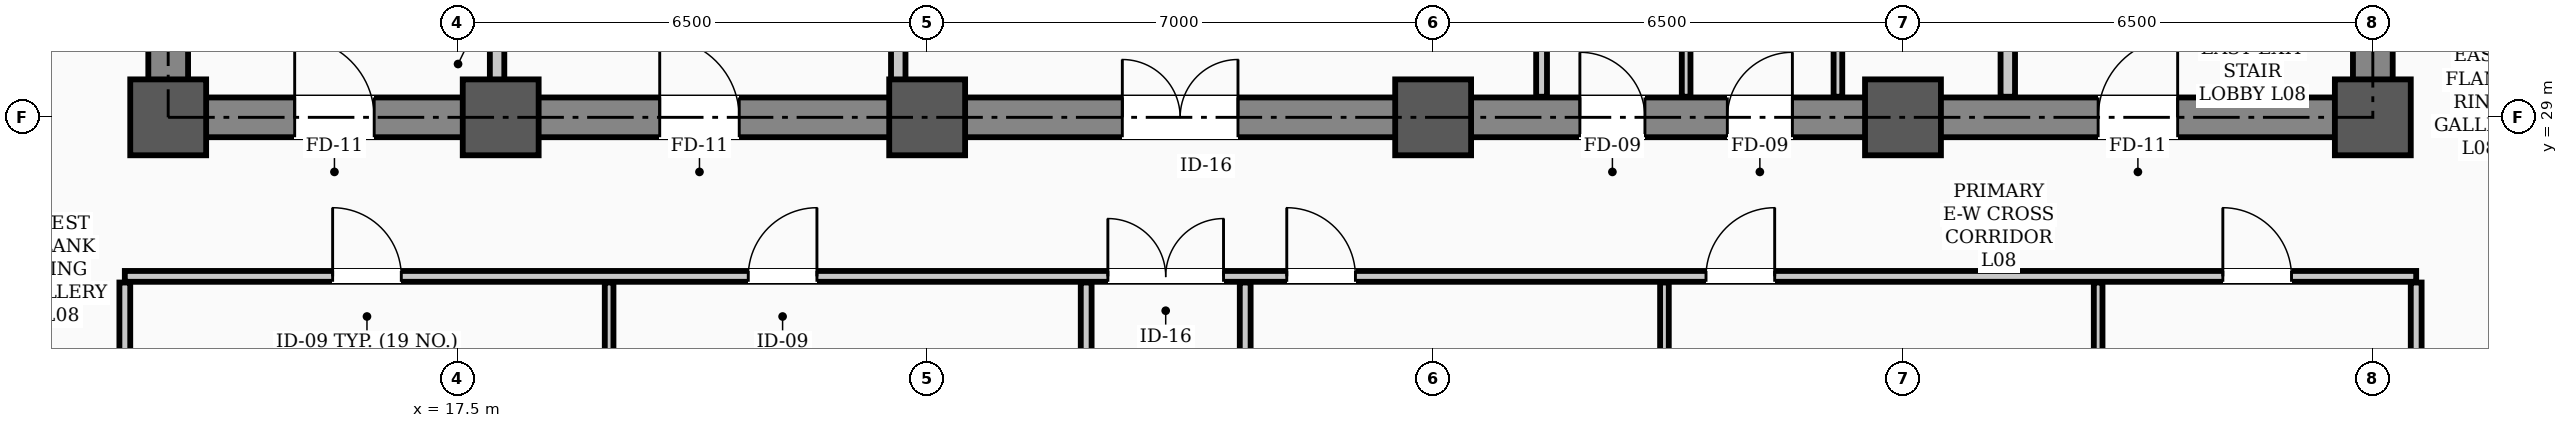
"""IFC4 building model, lengths in metres.
Left out: names, types, materials, properties, quantities, classifications, styles, units other than length and angle.
Written with IfcOpenShell. Run it as: python <this file> out.ifc"""

import sys

from ifc_helpers import new_model, si_unit, direction, frame, frame_2d, origin, origin_2d, place, context, subcontext, project, spatial, rectangle, hollow_rectangle, extrude, element, fill, save


model = new_model("IFC4")
c1 = context("Model", 3, precision=1e-05, world=origin(), true_north=direction((0.0, 1.0)))
c2 = subcontext(c1, "Body", "Model", "MODEL_VIEW")
j1 = project(units=[si_unit("LENGTHUNIT", "METRE"), si_unit("PLANEANGLEUNIT", "RADIAN")], contexts=[c1])
p1 = place(None, origin())
s1 = spatial("IfcSite", under=j1, at=p1, CompositionType="ELEMENT")
p2 = place(p1, origin())
s2 = spatial("IfcBuilding", under=s1, at=p2, CompositionType="ELEMENT")
p3 = place(p2, frame((0.0, 0.0, 34.3)))
s3 = spatial("IfcBuildingStorey", under=s2, at=p3, CompositionType="ELEMENT", Elevation=34.3)
for number, where, z_axis, x_axis in (
    (1, (13.5, 29.0, 0.0), (0.0, 0.0, 1.0), (1.0, 0.0, 0.0)),
    (2, (18.1, 29.0, 0.0), (0.0, 0.0, 1.0), (1.0, 0.0, 0.0)),
    (3, (24.0, 29.0, 0.0), (0.0, 0.0, 1.0), (1.0, 0.0, 0.0)),
    (4, (31.0, 29.0, 0.0), (0.0, 0.0, 1.0), (1.0, 0.0, 0.0)),
    (5, (37.5, 29.0, 0.0), (0.0, 0.0, 1.0), (1.0, 0.0, 0.0)),
    (6, (44.0, 29.0, 0.0), (0.0, 0.0, 1.0), (1.0, 0.0, 0.0)),
):
    element("IfcColumn", number, at=place(p3, frame(where, z_axis=z_axis, x_axis=x_axis)), inside=s3, PredefinedType="COLUMN", context=c2, shape_type="SweptSolid", body=[
        extrude(hollow_rectangle(XDim=1.05, YDim=1.05, WallThickness=0.038, InnerFilletRadius=0.019, OuterFilletRadius=0.057, at=origin_2d()), origin(), (0.0, 0.0, 1.0), 3.9),
    ])
p4 = place(p3, frame((13.5, 29.0, 0.0), z_axis=(0.0, 0.0, 1.0), x_axis=(1.0, 0.0, 0.0)))
e7 = element("IfcWall", 7, at=p4, inside=s3, PredefinedType="SHEAR", context=c2, shape_type="SweptSolid", body=[
    extrude(rectangle(XDim=30.5, YDim=0.55, at=frame_2d((15.25, 0.0))), origin(), (0.0, 0.0, 1.0), 3.72),
])
p5 = place(p4, frame((1.75, 0.0, 0.0)))
e8 = element("IfcOpeningElement", 8, at=p5, cuts=e7, PredefinedType="OPENING", context=c2, shape_type="SweptSolid", body=[
    extrude(rectangle(XDim=1.1, YDim=2.08, at=frame_2d((0.55, 1.04))), frame((0.0, 0.285, 0.0), z_axis=(0.0, -1.0, 0.0), x_axis=(1.0, 0.0, 0.0)), (0.0, 0.0, 1.0), 0.57),
])
p6 = place(p4, frame((26.7, 0.0, 0.0)))
e9 = element("IfcOpeningElement", 9, at=p6, cuts=e7, PredefinedType="OPENING", context=c2, shape_type="SweptSolid", body=[
    extrude(rectangle(XDim=1.1, YDim=2.08, at=frame_2d((0.55, 1.04))), frame((0.0, 0.285, 0.0), z_axis=(0.0, -1.0, 0.0), x_axis=(1.0, 0.0, 0.0)), (0.0, 0.0, 1.0), 0.57),
])
p7 = place(p4, frame((6.8, 0.0, 0.0)))
e10 = element("IfcOpeningElement", 10, at=p7, cuts=e7, PredefinedType="OPENING", context=c2, shape_type="SweptSolid", body=[
    extrude(rectangle(XDim=1.1, YDim=2.08, at=frame_2d((0.55, 1.04))), frame((0.0, 0.285, 0.0), z_axis=(0.0, -1.0, 0.0), x_axis=(1.0, 0.0, 0.0)), (0.0, 0.0, 1.0), 0.57),
])
p8 = place(p4, frame((13.2, 0.0, 0.0)))
e11 = element("IfcOpeningElement", 11, at=p8, cuts=e7, PredefinedType="OPENING", context=c2, shape_type="SweptSolid", body=[
    extrude(rectangle(XDim=1.6, YDim=2.08, at=frame_2d((0.8, 1.04))), frame((0.0, 0.285, 0.0), z_axis=(0.0, -1.0, 0.0), x_axis=(1.0, 0.0, 0.0)), (0.0, 0.0, 1.0), 0.57),
])
p9 = place(p4, frame((19.53, 0.0, 0.0)))
e12 = element("IfcOpeningElement", 12, at=p9, cuts=e7, PredefinedType="OPENING", context=c2, shape_type="SweptSolid", body=[
    extrude(rectangle(XDim=0.9, YDim=2.08, at=frame_2d((0.45, 1.04))), frame((0.0, 0.285, 0.0), z_axis=(0.0, -1.0, 0.0), x_axis=(1.0, 0.0, 0.0)), (0.0, 0.0, 1.0), 0.57),
])
p10 = place(p4, frame((21.57, 0.0, 0.0)))
e13 = element("IfcOpeningElement", 13, at=p10, cuts=e7, PredefinedType="OPENING", context=c2, shape_type="SweptSolid", body=[
    extrude(rectangle(XDim=0.9, YDim=2.08, at=frame_2d((0.45, 1.04))), frame((0.0, 0.285, 0.0), z_axis=(0.0, -1.0, 0.0), x_axis=(1.0, 0.0, 0.0)), (0.0, 0.0, 1.0), 0.57),
])
for number, where, z_axis, x_axis in (
    (14, (13.5, 29.35, 0.0), (0.0, 0.0, 1.0), (0.0, 1.0, 0.0)),
    (15, (44.0, 29.35, 0.0), (0.0, 0.0, 1.0), (0.0, 1.0, 0.0)),
):
    element("IfcWall", number, at=place(p3, frame(where, z_axis=z_axis, x_axis=x_axis)), inside=s3, PredefinedType="SHEAR", context=c2, shape_type="SweptSolid", body=[
        extrude(rectangle(XDim=8.6, YDim=0.55, at=frame_2d((4.3, 0.0))), origin(), (0.0, 0.0, 1.0), 3.72),
    ])
p11 = place(p3, frame((12.9, 26.8, 0.0), z_axis=(0.0, 0.0, 1.0), x_axis=(1.0, 0.0, 0.0)))
e16 = element("IfcWall", 16, at=p11, inside=s3, PredefinedType="PARTITIONING", context=c2, shape_type="SweptSolid", body=[
    extrude(rectangle(XDim=31.7, YDim=0.15, at=frame_2d((15.85, 0.0))), origin(), (0.0, 0.0, 1.0), 3.1),
])
p12 = place(p11, frame((13.6, 0.0, 0.0)))
e17 = element("IfcOpeningElement", 17, at=p12, cuts=e16, PredefinedType="OPENING", context=c2, shape_type="SweptSolid", body=[
    extrude(rectangle(XDim=1.6, YDim=2.08, at=frame_2d((0.8, 1.04))), frame((0.0, 0.085, 0.0), z_axis=(0.0, -1.0, 0.0), x_axis=(1.0, 0.0, 0.0)), (0.0, 0.0, 1.0), 0.17),
])
p13 = place(p11, frame((2.875, 0.0, 0.0)))
e18 = element("IfcOpeningElement", 18, at=p13, cuts=e16, PredefinedType="OPENING", context=c2, shape_type="SweptSolid", body=[
    extrude(rectangle(XDim=0.95, YDim=2.08, at=frame_2d((0.475, 1.04))), frame((0.0, 0.085, 0.0), z_axis=(0.0, -1.0, 0.0), x_axis=(1.0, 0.0, 0.0)), (0.0, 0.0, 1.0), 0.17),
])
p14 = place(p11, frame((8.625, 0.0, 0.0)))
e19 = element("IfcOpeningElement", 19, at=p14, cuts=e16, PredefinedType="OPENING", context=c2, shape_type="SweptSolid", body=[
    extrude(rectangle(XDim=0.95, YDim=2.08, at=frame_2d((0.475, 1.04))), frame((0.0, 0.085, 0.0), z_axis=(0.0, -1.0, 0.0), x_axis=(1.0, 0.0, 0.0)), (0.0, 0.0, 1.0), 0.17),
])
p15 = place(p11, frame((16.075, 0.0, 0.0)))
e20 = element("IfcOpeningElement", 20, at=p15, cuts=e16, PredefinedType="OPENING", context=c2, shape_type="SweptSolid", body=[
    extrude(rectangle(XDim=0.95, YDim=2.08, at=frame_2d((0.475, 1.04))), frame((0.0, 0.085, 0.0), z_axis=(0.0, -1.0, 0.0), x_axis=(1.0, 0.0, 0.0)), (0.0, 0.0, 1.0), 0.17),
])
p16 = place(p11, frame((21.875, 0.0, 0.0)))
e21 = element("IfcOpeningElement", 21, at=p16, cuts=e16, PredefinedType="OPENING", context=c2, shape_type="SweptSolid", body=[
    extrude(rectangle(XDim=0.95, YDim=2.08, at=frame_2d((0.475, 1.04))), frame((0.0, 0.085, 0.0), z_axis=(0.0, -1.0, 0.0), x_axis=(1.0, 0.0, 0.0)), (0.0, 0.0, 1.0), 0.17),
])
p17 = place(p11, frame((29.025, 0.0, 0.0)))
e22 = element("IfcOpeningElement", 22, at=p17, cuts=e16, PredefinedType="OPENING", context=c2, shape_type="SweptSolid", body=[
    extrude(rectangle(XDim=0.95, YDim=2.08, at=frame_2d((0.475, 1.04))), frame((0.0, 0.085, 0.0), z_axis=(0.0, -1.0, 0.0), x_axis=(1.0, 0.0, 0.0)), (0.0, 0.0, 1.0), 0.17),
])
for number, where, z_axis, x_axis in (
    (23, (18.05, 29.285, 0.0), (0.0, 0.0, 1.0), (0.0, 1.0, 0.0)),
    (24, (38.95, 29.285, 0.0), (0.0, 0.0, 1.0), (0.0, 1.0, 0.0)),
):
    element("IfcWall", number, at=place(p3, frame(where, z_axis=z_axis, x_axis=x_axis)), inside=s3, PredefinedType="STANDARD", context=c2, shape_type="SweptSolid", body=[
        extrude(rectangle(XDim=1.015, YDim=0.2, at=frame_2d((0.508, 0.0))), origin(), (0.0, 0.0, 1.0), 3.3),
    ])
p18 = place(p3, frame((23.6, 29.285, 0.0), z_axis=(0.0, 0.0, 1.0), x_axis=(0.0, 1.0, 0.0)))
e25 = element("IfcWall", 25, at=p18, inside=s3, PredefinedType="STANDARD", context=c2, shape_type="SweptSolid", body=[
    extrude(rectangle(XDim=5.415, YDim=0.2, at=frame_2d((2.708, 0.0))), origin(), (0.0, 0.0, 1.0), 3.1),
])
p19 = place(p3, frame((32.5, 29.285, 0.0), z_axis=(0.0, 0.0, 1.0), x_axis=(0.0, 1.0, 0.0)))
e26 = element("IfcWall", 26, at=p19, inside=s3, PredefinedType="PARTITIONING", context=c2, shape_type="SweptSolid", body=[
    extrude(rectangle(XDim=2.48, YDim=0.15, at=frame_2d((1.24, 0.0))), origin(), (0.0, 0.0, 1.0), 3.3),
])
for number, where, z_axis, x_axis in (
    (27, (36.6, 29.285, 0.0), (0.0, 0.0, 1.0), (0.0, 1.0, 0.0)),
    (28, (34.5, 29.285, 0.0), (0.0, 0.0, 1.0), (0.0, 1.0, 0.0)),
):
    element("IfcWall", number, at=place(p3, frame(where, z_axis=z_axis, x_axis=x_axis)), inside=s3, PredefinedType="PARTITIONING", context=c2, shape_type="SweptSolid", body=[
        extrude(rectangle(XDim=2.48, YDim=0.12, at=frame_2d((1.24, 0.0))), origin(), (0.0, 0.0, 1.0), 3.3),
    ])
for number, where, z_axis, x_axis in (
    (29, (26.2, 19.335, 0.0), (0.0, 0.0, 1.0), (0.0, 1.0, 0.0)),
    (30, (28.4, 19.335, 0.0), (0.0, 0.0, 1.0), (0.0, 1.0, 0.0)),
    (31, (12.9, 19.335, 0.0), (0.0, 0.0, 1.0), (0.0, 1.0, 0.0)),
    (32, (44.6, 19.335, 0.0), (0.0, 0.0, 1.0), (0.0, 1.0, 0.0)),
):
    element("IfcWall", number, at=place(p3, frame(where, z_axis=z_axis, x_axis=x_axis)), inside=s3, PredefinedType="PARTITIONING", context=c2, shape_type="SweptSolid", body=[
        extrude(rectangle(XDim=7.38, YDim=0.15, at=frame_2d((3.69, 0.0))), origin(), (0.0, 0.0, 1.0), 3.0),
    ])
for number, where, z_axis, x_axis in (
    (33, (19.6, 19.335, 0.0), (0.0, 0.0, 1.0), (0.0, 1.0, 0.0)),
    (34, (34.2, 19.335, 0.0), (0.0, 0.0, 1.0), (0.0, 1.0, 0.0)),
    (35, (40.2, 19.335, 0.0), (0.0, 0.0, 1.0), (0.0, 1.0, 0.0)),
):
    element("IfcWall", number, at=place(p3, frame(where, z_axis=z_axis, x_axis=x_axis)), inside=s3, PredefinedType="PARTITIONING", context=c2, shape_type="SweptSolid", body=[
        extrude(rectangle(XDim=7.38, YDim=0.12, at=frame_2d((3.69, 0.0))), origin(), (0.0, 0.0, 1.0), 3.0),
    ])
p20 = place(p5, origin())
e36 = element("IfcDoor", 36, at=p20, inside=s3, OperationType="SINGLE_SWING_LEFT", PredefinedType="DOOR", context=c2, shape_type="SweptSolid", body=[
    extrude(rectangle(XDim=1.1, YDim=2.08, at=frame_2d((0.55, 1.04))), frame((0.0, 0.025, 0.0), z_axis=(0.0, -1.0, 0.0), x_axis=(1.0, 0.0, 0.0)), (0.0, 0.0, 1.0), 0.05),
])
fill(e8, e36)
p21 = place(p6, origin())
e37 = element("IfcDoor", 37, at=p21, inside=s3, OperationType="SINGLE_SWING_RIGHT", PredefinedType="DOOR", context=c2, shape_type="SweptSolid", body=[
    extrude(rectangle(XDim=1.1, YDim=2.08, at=frame_2d((0.55, 1.04))), frame((0.0, 0.025, 0.0), z_axis=(0.0, -1.0, 0.0), x_axis=(1.0, 0.0, 0.0)), (0.0, 0.0, 1.0), 0.05),
])
fill(e9, e37)
p22 = place(p7, origin())
e38 = element("IfcDoor", 38, at=p22, inside=s3, OperationType="SINGLE_SWING_LEFT", PredefinedType="DOOR", context=c2, shape_type="SweptSolid", body=[
    extrude(rectangle(XDim=1.1, YDim=2.08, at=frame_2d((0.55, 1.04))), frame((0.0, 0.025, 0.0), z_axis=(0.0, -1.0, 0.0), x_axis=(1.0, 0.0, 0.0)), (0.0, 0.0, 1.0), 0.05),
])
fill(e10, e38)
p23 = place(p8, origin())
e39 = element("IfcDoor", 39, at=p23, inside=s3, OperationType="DOUBLE_DOOR_SINGLE_SWING", PredefinedType="DOOR", context=c2, shape_type="SweptSolid", body=[
    extrude(rectangle(XDim=1.6, YDim=2.08, at=frame_2d((0.8, 1.04))), frame((0.0, 0.025, 0.0), z_axis=(0.0, -1.0, 0.0), x_axis=(1.0, 0.0, 0.0)), (0.0, 0.0, 1.0), 0.05),
])
fill(e11, e39)
p24 = place(p9, origin())
e40 = element("IfcDoor", 40, at=p24, inside=s3, OperationType="SINGLE_SWING_LEFT", PredefinedType="DOOR", context=c2, shape_type="SweptSolid", body=[
    extrude(rectangle(XDim=0.9, YDim=2.08, at=frame_2d((0.45, 1.04))), frame((0.0, 0.025, 0.0), z_axis=(0.0, -1.0, 0.0), x_axis=(1.0, 0.0, 0.0)), (0.0, 0.0, 1.0), 0.05),
])
fill(e12, e40)
p25 = place(p10, origin())
e41 = element("IfcDoor", 41, at=p25, inside=s3, OperationType="SINGLE_SWING_RIGHT", PredefinedType="DOOR", context=c2, shape_type="SweptSolid", body=[
    extrude(rectangle(XDim=0.9, YDim=2.08, at=frame_2d((0.45, 1.04))), frame((0.0, 0.025, 0.0), z_axis=(0.0, -1.0, 0.0), x_axis=(1.0, 0.0, 0.0)), (0.0, 0.0, 1.0), 0.05),
])
fill(e13, e41)
p26 = place(p12, origin())
e42 = element("IfcDoor", 42, at=p26, inside=s3, OperationType="DOUBLE_DOOR_SINGLE_SWING", PredefinedType="DOOR", context=c2, shape_type="SweptSolid", body=[
    extrude(rectangle(XDim=1.6, YDim=2.08, at=frame_2d((0.8, 1.04))), frame((0.0, 0.025, 0.0), z_axis=(0.0, -1.0, 0.0), x_axis=(1.0, 0.0, 0.0)), (0.0, 0.0, 1.0), 0.05),
])
fill(e17, e42)
p27 = place(p13, origin())
e43 = element("IfcDoor", 43, at=p27, inside=s3, OperationType="SINGLE_SWING_LEFT", PredefinedType="DOOR", context=c2, shape_type="SweptSolid", body=[
    extrude(rectangle(XDim=0.95, YDim=2.08, at=frame_2d((0.475, 1.04))), frame((0.0, 0.025, 0.0), z_axis=(0.0, -1.0, 0.0), x_axis=(1.0, 0.0, 0.0)), (0.0, 0.0, 1.0), 0.05),
])
fill(e18, e43)
p28 = place(p14, origin())
e44 = element("IfcDoor", 44, at=p28, inside=s3, OperationType="SINGLE_SWING_RIGHT", PredefinedType="DOOR", context=c2, shape_type="SweptSolid", body=[
    extrude(rectangle(XDim=0.95, YDim=2.08, at=frame_2d((0.475, 1.04))), frame((0.0, 0.025, 0.0), z_axis=(0.0, -1.0, 0.0), x_axis=(1.0, 0.0, 0.0)), (0.0, 0.0, 1.0), 0.05),
])
fill(e19, e44)
p29 = place(p15, origin())
e45 = element("IfcDoor", 45, at=p29, inside=s3, OperationType="SINGLE_SWING_LEFT", PredefinedType="DOOR", context=c2, shape_type="SweptSolid", body=[
    extrude(rectangle(XDim=0.95, YDim=2.08, at=frame_2d((0.475, 1.04))), frame((0.0, 0.025, 0.0), z_axis=(0.0, -1.0, 0.0), x_axis=(1.0, 0.0, 0.0)), (0.0, 0.0, 1.0), 0.05),
])
fill(e20, e45)
p30 = place(p16, origin())
e46 = element("IfcDoor", 46, at=p30, inside=s3, OperationType="SINGLE_SWING_RIGHT", PredefinedType="DOOR", context=c2, shape_type="SweptSolid", body=[
    extrude(rectangle(XDim=0.95, YDim=2.08, at=frame_2d((0.475, 1.04))), frame((0.0, 0.025, 0.0), z_axis=(0.0, -1.0, 0.0), x_axis=(1.0, 0.0, 0.0)), (0.0, 0.0, 1.0), 0.05),
])
fill(e21, e46)
p31 = place(p17, origin())
e47 = element("IfcDoor", 47, at=p31, inside=s3, OperationType="SINGLE_SWING_LEFT", PredefinedType="DOOR", context=c2, shape_type="SweptSolid", body=[
    extrude(rectangle(XDim=0.95, YDim=2.08, at=frame_2d((0.475, 1.04))), frame((0.0, 0.025, 0.0), z_axis=(0.0, -1.0, 0.0), x_axis=(1.0, 0.0, 0.0)), (0.0, 0.0, 1.0), 0.05),
])
fill(e22, e47)
save(model, sys.argv[1])
